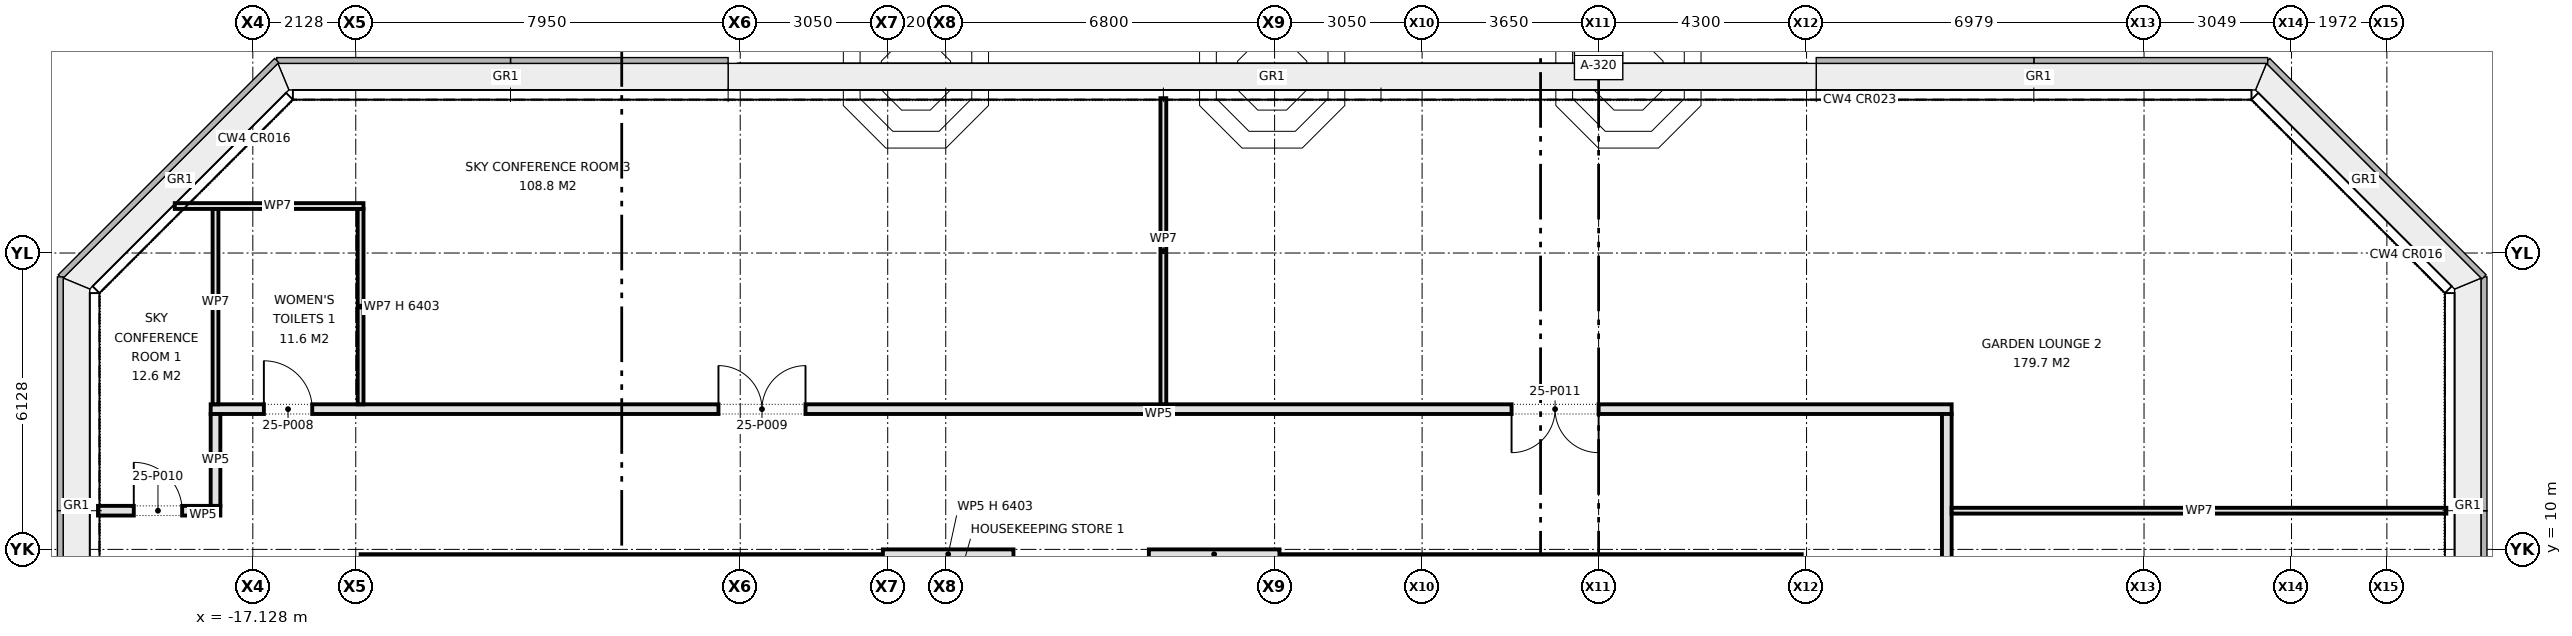
"""IFC4 building model, lengths in metres.
Left out: names, types, materials, properties, quantities, classifications, styles, units other than length and angle.
Written with IfcOpenShell. Run it as: python <this file> out.ifc"""

import sys

from ifc_helpers import new_model, si_unit, direction, frame, frame_2d, origin, place, context, subcontext, project, spatial, rectangle, extrude, element, fill, save


model = new_model("IFC4")
c1 = context("Model", 3, precision=1e-05, world=origin(), true_north=direction((0.0, 1.0)))
c2 = subcontext(c1, "Body", "Model", "MODEL_VIEW")
j1 = project(units=[si_unit("LENGTHUNIT", "METRE"), si_unit("PLANEANGLEUNIT", "RADIAN")], contexts=[c1])
p1 = place(None, origin())
s1 = spatial("IfcSite", under=j1, at=p1, CompositionType="ELEMENT")
p2 = place(p1, origin())
s2 = spatial("IfcBuilding", under=s1, at=p2, CompositionType="ELEMENT")
p3 = place(p2, frame((0.0, 0.0, 112.8)))
s3 = spatial("IfcBuildingStorey", under=s2, at=p3, CompositionType="ELEMENT", Elevation=112.8)
for number, where, z_axis, x_axis in (
    (1, (-14.9, 9.4, 0.0), (0.0, 0.0, 1.0), (1.0, 0.0, 0.0)),
    (2, (14.9, 9.4, 0.0), (0.0, 0.0, 1.0), (-1.0, 0.0, 0.0)),
):
    element("IfcWall", number, at=place(p3, frame(where, z_axis=z_axis, x_axis=x_axis)), inside=s3, PredefinedType="SHEAR", context=c2, shape_type="SweptSolid", body=[
        extrude(rectangle(XDim=10.8, YDim=1.0, at=frame_2d((5.4, 0.0))), origin(), (0.0, 0.0, 1.0), 7.35),
    ])
for number, where, z_axis, x_axis in (
    (3, (-4.1, 9.9, 0.0), (0.0, 0.0, 1.0), (1.0, 0.0, 0.0)),
    (4, (1.4, 9.9, 0.0), (0.0, 0.0, 1.0), (1.0, 0.0, 0.0)),
):
    element("IfcWall", number, at=place(p3, frame(where, z_axis=z_axis, x_axis=x_axis)), inside=s3, PredefinedType="PARTITIONING", context=c2, shape_type="SweptSolid", body=[
        extrude(rectangle(XDim=2.7, YDim=0.2, at=frame_2d((1.35, 0.0))), origin(), (0.0, 0.0, 1.0), 6.403),
    ])
p4 = place(p3, frame((-20.33, 10.8, 0.0), z_axis=(0.0, 0.0, 1.0), x_axis=(1.0, 0.0, 0.0)))
e5 = element("IfcWall", 5, at=p4, inside=s3, PredefinedType="PARTITIONING", context=c2, shape_type="SweptSolid", body=[
    extrude(rectangle(XDim=2.53, YDim=0.2, at=frame_2d((1.265, 0.0))), origin(), (0.0, 0.0, 1.0), 7.35),
])
p5 = place(p4, frame((0.74, 0.0, 0.0)))
e6 = element("IfcOpeningElement", 6, at=p5, cuts=e5, PredefinedType="OPENING", context=c2, shape_type="SweptSolid", body=[
    extrude(rectangle(XDim=1.0, YDim=2.1, at=frame_2d((0.5, 1.05))), frame((0.0, 0.11, 0.0), z_axis=(0.0, -1.0, 0.0), x_axis=(1.0, 0.0, 0.0)), (0.0, 0.0, 1.0), 0.22),
])
p6 = place(p3, frame((-18.0, 12.9, 0.0), z_axis=(0.0, 0.0, 1.0), x_axis=(1.0, 0.0, 0.0)))
e7 = element("IfcWall", 7, at=p6, inside=s3, PredefinedType="PARTITIONING", context=c2, shape_type="SweptSolid", body=[
    extrude(rectangle(XDim=36.0, YDim=0.2, at=frame_2d((18.0, 0.0))), origin(), (0.0, 0.0, 1.0), 7.35),
])
p7 = place(p6, frame((1.1, 0.0, 0.0)))
e8 = element("IfcOpeningElement", 8, at=p7, cuts=e7, PredefinedType="OPENING", context=c2, shape_type="SweptSolid", body=[
    extrude(rectangle(XDim=1.0, YDim=2.1, at=frame_2d((0.5, 1.05))), frame((0.0, 0.11, 0.0), z_axis=(0.0, -1.0, 0.0), x_axis=(1.0, 0.0, 0.0)), (0.0, 0.0, 1.0), 0.22),
])
p8 = place(p6, frame((10.5, 0.0, 0.0)))
e9 = element("IfcOpeningElement", 9, at=p8, cuts=e7, PredefinedType="OPENING", context=c2, shape_type="SweptSolid", body=[
    extrude(rectangle(XDim=1.8, YDim=2.1, at=frame_2d((0.9, 1.05))), frame((0.0, 0.11, 0.0), z_axis=(0.0, -1.0, 0.0), x_axis=(1.0, 0.0, 0.0)), (0.0, 0.0, 1.0), 0.22),
])
p9 = place(p6, frame((26.9, 0.0, 0.0)))
e10 = element("IfcOpeningElement", 10, at=p9, cuts=e7, PredefinedType="OPENING", context=c2, shape_type="SweptSolid", body=[
    extrude(rectangle(XDim=1.8, YDim=2.1, at=frame_2d((0.9, 1.05))), frame((0.0, 0.11, 0.0), z_axis=(0.0, -1.0, 0.0), x_axis=(1.0, 0.0, 0.0)), (0.0, 0.0, 1.0), 0.22),
])
p10 = place(p3, frame((17.9, -12.8, 0.0), z_axis=(0.0, 0.0, 1.0), x_axis=(0.0, 1.0, 0.0)))
e11 = element("IfcWall", 11, at=p10, inside=s3, PredefinedType="PARTITIONING", context=c2, shape_type="SweptSolid", body=[
    extrude(rectangle(XDim=25.6, YDim=0.2, at=frame_2d((12.8, 0.0))), origin(), (0.0, 0.0, 1.0), 7.35),
])
p11 = place(p10, frame((11.85, 0.0, 0.0)))
e12 = element("IfcOpeningElement", 12, at=p11, cuts=e11, PredefinedType="OPENING", context=c2, shape_type="SweptSolid", body=[
    extrude(rectangle(XDim=1.8, YDim=2.1, at=frame_2d((0.9, 1.05))), frame((0.0, 0.11, 0.0), z_axis=(0.0, -1.0, 0.0), x_axis=(1.0, 0.0, 0.0)), (0.0, 0.0, 1.0), 0.22),
])
p12 = place(p10, frame((0.4, 0.0, 0.0)))
e13 = element("IfcOpeningElement", 13, at=p12, cuts=e11, PredefinedType="OPENING", context=c2, shape_type="SweptSolid", body=[
    extrude(rectangle(XDim=1.0, YDim=2.1, at=frame_2d((0.5, 1.05))), frame((0.0, 0.11, 0.0), z_axis=(0.0, -1.0, 0.0), x_axis=(1.0, 0.0, 0.0)), (0.0, 0.0, 1.0), 0.22),
])
p13 = place(p3, frame((-17.9, 10.9, 0.0), z_axis=(0.0, 0.0, 1.0), x_axis=(0.0, 1.0, 0.0)))
e14 = element("IfcWall", 14, at=p13, inside=s3, PredefinedType="PARTITIONING", context=c2, shape_type="SweptSolid", body=[
    extrude(rectangle(XDim=1.9, YDim=0.2, at=frame_2d((0.95, 0.0))), origin(), (0.0, 0.0, 1.0), 7.35),
])
p14 = place(p3, frame((18.0, 10.8, 0.0), z_axis=(0.0, 0.0, 1.0), x_axis=(1.0, 0.0, 0.0)))
e15 = element("IfcWall", 15, at=p14, inside=s3, PredefinedType="PARTITIONING", context=c2, shape_type="SweptSolid", body=[
    extrude(rectangle(XDim=10.23, YDim=0.12, at=frame_2d((5.115, 0.0))), origin(), (0.0, 0.0, 1.0), 7.35),
])
p15 = place(p3, frame((-18.742, 17.1, 0.0), z_axis=(0.0, 0.0, 1.0), x_axis=(1.0, 0.0, 0.0)))
e16 = element("IfcWall", 16, at=p15, inside=s3, PredefinedType="PARTITIONING", context=c2, shape_type="SweptSolid", body=[
    extrude(rectangle(XDim=3.901, YDim=0.12, at=frame_2d((1.951, 0.0))), origin(), (0.0, 0.0, 1.0), 7.35),
])
p16 = place(p3, frame((1.7, 13.0, 0.0), z_axis=(0.0, 0.0, 1.0), x_axis=(0.0, 1.0, 0.0)))
e17 = element("IfcWall", 17, at=p16, inside=s3, PredefinedType="PARTITIONING", context=c2, shape_type="SweptSolid", body=[
    extrude(rectangle(XDim=6.33, YDim=0.12, at=frame_2d((3.165, 0.0))), origin(), (0.0, 0.0, 1.0), 7.35),
])
p17 = place(p3, frame((-14.9, 13.0, 0.0), z_axis=(0.0, 0.0, 1.0), x_axis=(0.0, 1.0, 0.0)))
e18 = element("IfcWall", 18, at=p17, inside=s3, PredefinedType="PARTITIONING", context=c2, shape_type="SweptSolid", body=[
    extrude(rectangle(XDim=4.039, YDim=0.12, at=frame_2d((2.02, 0.0))), origin(), (0.0, 0.0, 1.0), 6.403),
])
p18 = place(p3, frame((-17.9, 13.0, 0.0), z_axis=(0.0, 0.0, 1.0), x_axis=(0.0, 1.0, 0.0)))
e19 = element("IfcWall", 19, at=p18, inside=s3, PredefinedType="PARTITIONING", context=c2, shape_type="SweptSolid", body=[
    extrude(rectangle(XDim=4.039, YDim=0.12, at=frame_2d((2.02, 0.0))), origin(), (0.0, 0.0, 1.0), 7.35),
])
p19 = place(p7, origin())
e20 = element("IfcDoor", 20, at=p19, inside=s3, OperationType="SINGLE_SWING_LEFT", PredefinedType="DOOR", context=c2, shape_type="SweptSolid", body=[
    extrude(rectangle(XDim=1.0, YDim=2.1, at=frame_2d((0.5, 1.05))), frame((0.0, 0.025, 0.0), z_axis=(0.0, -1.0, 0.0), x_axis=(1.0, 0.0, 0.0)), (0.0, 0.0, 1.0), 0.05),
])
fill(e8, e20)
p20 = place(p8, origin())
e21 = element("IfcDoor", 21, at=p20, inside=s3, OperationType="DOUBLE_DOOR_SINGLE_SWING", PredefinedType="DOOR", context=c2, shape_type="SweptSolid", body=[
    extrude(rectangle(XDim=1.8, YDim=2.1, at=frame_2d((0.9, 1.05))), frame((0.0, 0.025, 0.0), z_axis=(0.0, -1.0, 0.0), x_axis=(1.0, 0.0, 0.0)), (0.0, 0.0, 1.0), 0.05),
])
fill(e9, e21)
p21 = place(p5, origin())
e22 = element("IfcDoor", 22, at=p21, inside=s3, OperationType="SINGLE_SWING_LEFT", PredefinedType="DOOR", context=c2, shape_type="SweptSolid", body=[
    extrude(rectangle(XDim=1.0, YDim=2.1, at=frame_2d((0.5, 1.05))), frame((0.0, 0.025, 0.0), z_axis=(0.0, -1.0, 0.0), x_axis=(1.0, 0.0, 0.0)), (0.0, 0.0, 1.0), 0.05),
])
fill(e6, e22)
p22 = place(p9, frame((1.8, 0.0, 0.0), z_axis=(0.0, 0.0, 1.0), x_axis=(-1.0, 0.0, 0.0)))
e23 = element("IfcDoor", 23, at=p22, inside=s3, OperationType="DOUBLE_DOOR_SINGLE_SWING", PredefinedType="DOOR", context=c2, shape_type="SweptSolid", body=[
    extrude(rectangle(XDim=1.8, YDim=2.1, at=frame_2d((0.9, 1.05))), frame((0.0, 0.025, 0.0), z_axis=(0.0, -1.0, 0.0), x_axis=(1.0, 0.0, 0.0)), (0.0, 0.0, 1.0), 0.05),
])
fill(e10, e23)
save(model, sys.argv[1])
